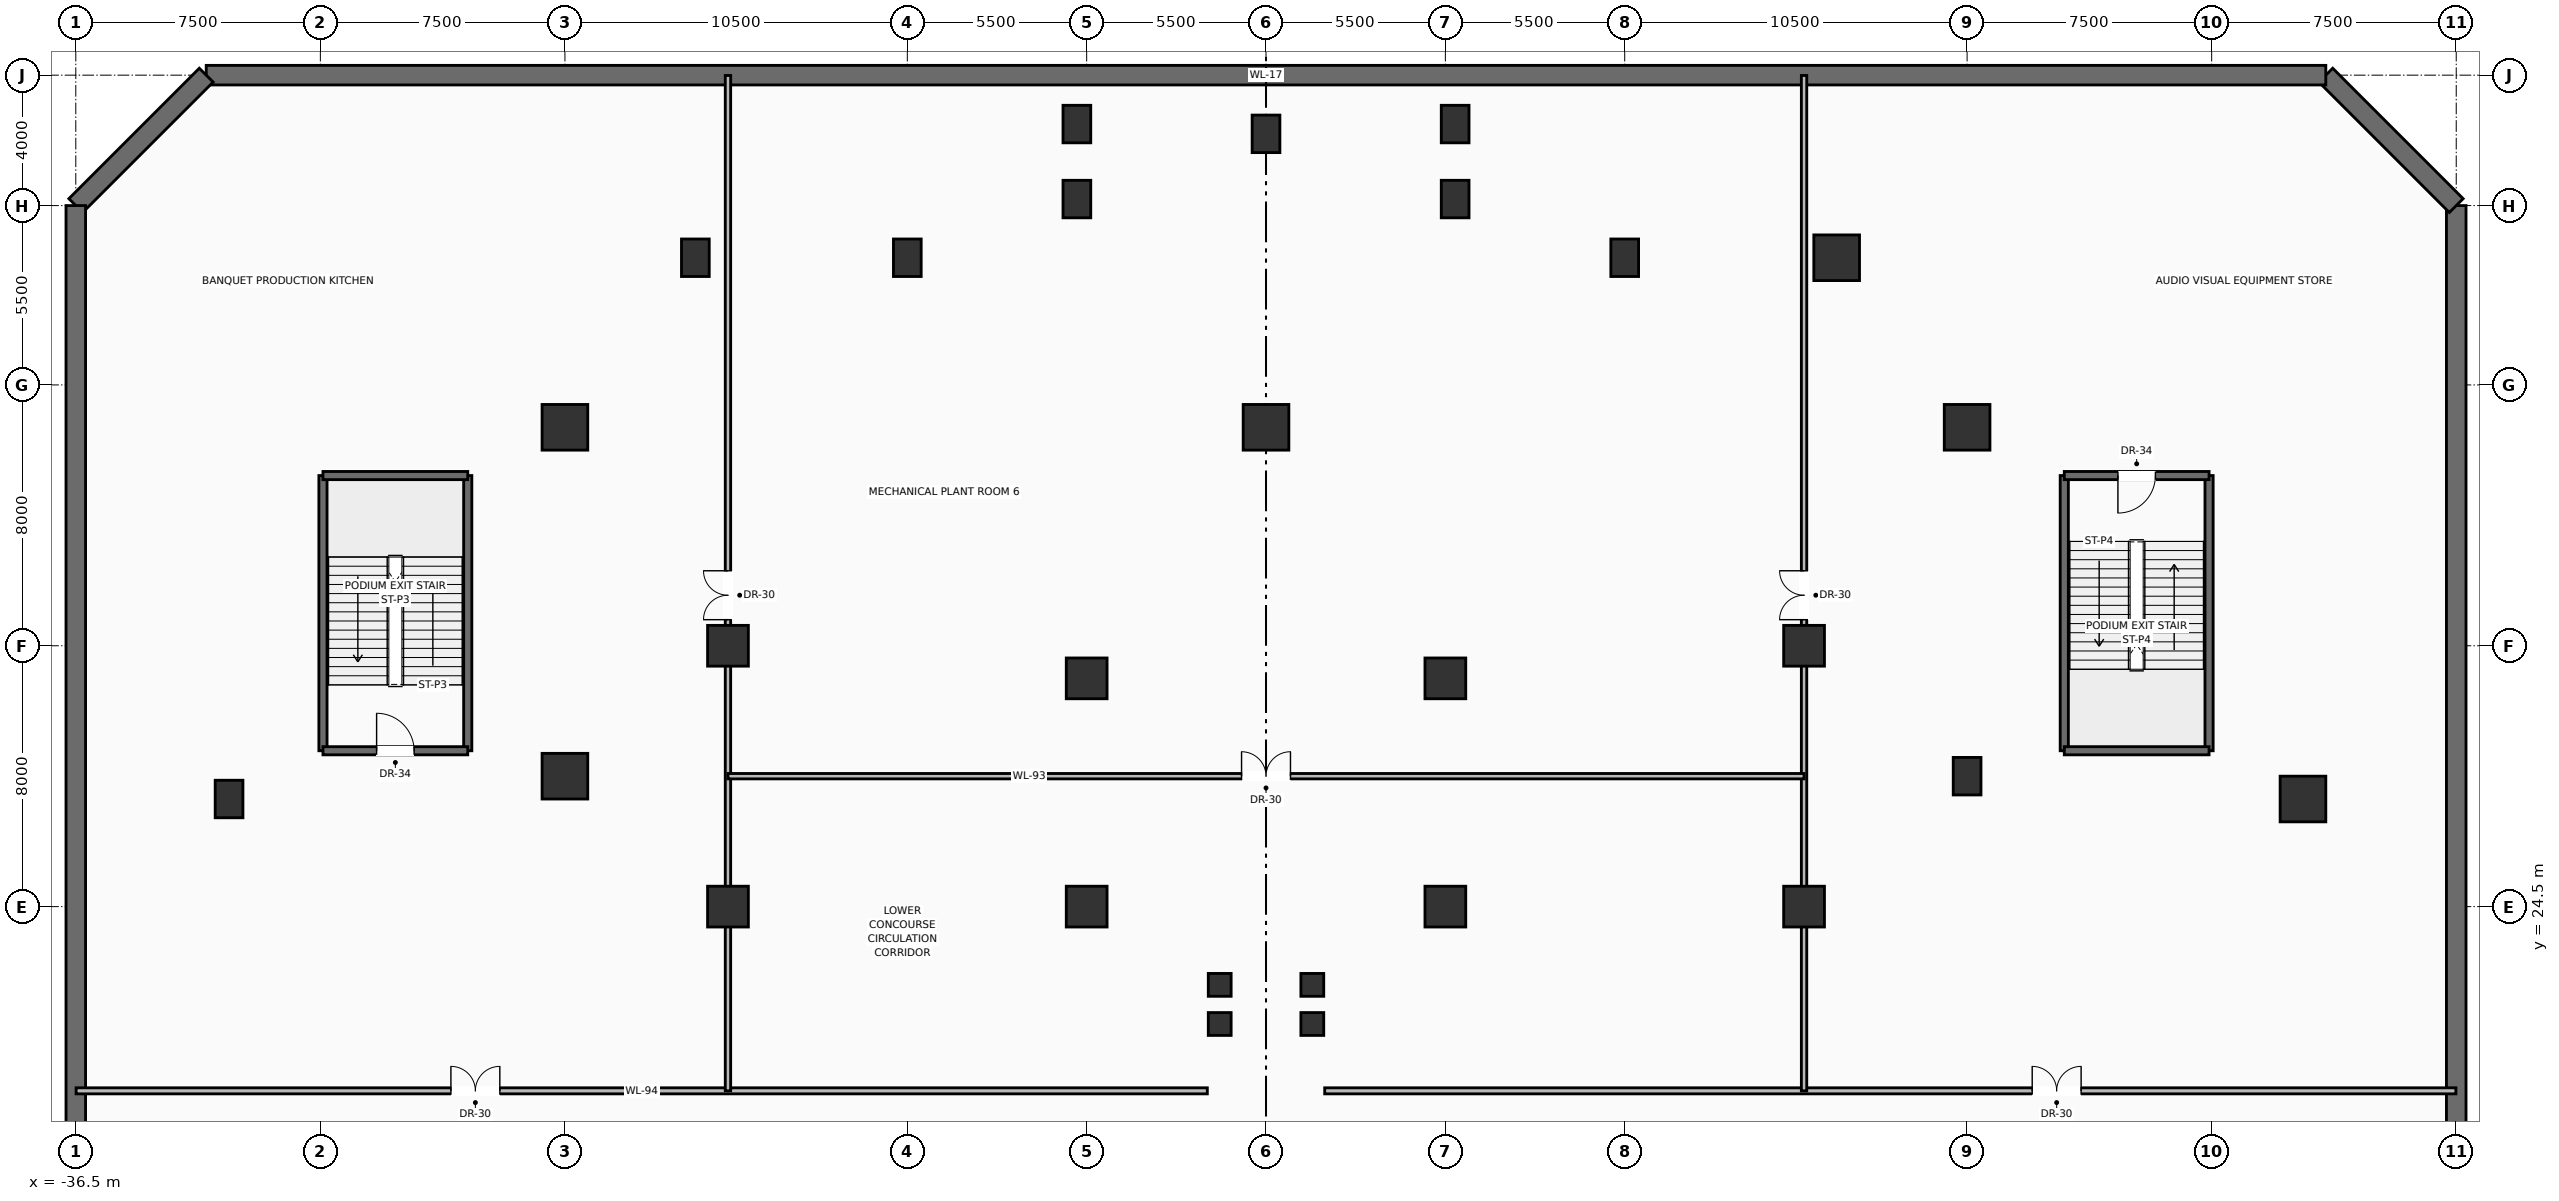
"""IFC4 building model, lengths in metres.
Left out: names, types, materials, properties, quantities, classifications, styles, units other than length and angle.
Written with IfcOpenShell. Run it as: python <this file> out.ifc"""

import sys

from ifc_helpers import new_model, si_unit, direction, frame, frame_2d, origin, origin_2d, place, context, subcontext, project, spatial, rectangle, hollow_rectangle, extrude, source, transform, mapped, element, fill, save


model = new_model("IFC4")
c1 = context("Model", 3, precision=1e-05, world=origin(), true_north=direction((0.0, 1.0)))
c2 = subcontext(c1, "Body", "Model", "MODEL_VIEW")
j1 = project(units=[si_unit("LENGTHUNIT", "METRE"), si_unit("PLANEANGLEUNIT", "RADIAN")], contexts=[c1])
p1 = place(None, origin())
s1 = spatial("IfcSite", under=j1, at=p1, CompositionType="ELEMENT")
p2 = place(p1, origin())
s2 = spatial("IfcBuilding", under=s1, at=p2, CompositionType="ELEMENT")
p3 = place(p2, frame((0.0, 0.0, -5.0)))
s3 = spatial("IfcBuildingStorey", under=s2, at=p3, CompositionType="ELEMENT", Elevation=-5.0)
p4 = place(p3, frame((36.5, 4.0, 0.0), z_axis=(0.0, 0.0, 1.0), x_axis=(0.0, 1.0, 0.0)))
e1 = element("IfcWall", 1, at=p4, inside=s3, PredefinedType="SOLIDWALL", context=c2, shape_type="SweptSolid", body=[
    extrude(rectangle(XDim=42.0, YDim=0.6, at=frame_2d((21.0, 0.0))), origin(), (0.0, 0.0, 1.0), 4.64),
])
p5 = place(p3, frame((36.5, 46.0, 0.0), z_axis=(0.0, 0.0, 1.0), x_axis=(-0.707106781187, 0.707106781187, 0.0)))
e2 = element("IfcWall", 2, at=p5, inside=s3, PredefinedType="SOLIDWALL", context=c2, shape_type="SweptSolid", body=[
    extrude(rectangle(XDim=5.657, YDim=0.6, at=frame_2d((2.828, 0.0))), origin(), (0.0, 0.0, 1.0), 4.64),
])
p6 = place(p3, frame((32.5, 50.0, 0.0), z_axis=(0.0, 0.0, 1.0), x_axis=(-1.0, 0.0, 0.0)))
e3 = element("IfcWall", 3, at=p6, inside=s3, PredefinedType="SOLIDWALL", context=c2, shape_type="SweptSolid", body=[
    extrude(rectangle(XDim=65.0, YDim=0.6, at=frame_2d((32.5, 0.0))), origin(), (0.0, 0.0, 1.0), 4.64),
])
p7 = place(p3, frame((-32.5, 50.0, 0.0), z_axis=(0.0, 0.0, 1.0), x_axis=(-0.707106781187, -0.707106781187, 0.0)))
e4 = element("IfcWall", 4, at=p7, inside=s3, PredefinedType="SOLIDWALL", context=c2, shape_type="SweptSolid", body=[
    extrude(rectangle(XDim=5.657, YDim=0.6, at=frame_2d((2.828, 0.0))), origin(), (0.0, 0.0, 1.0), 4.64),
])
p8 = place(p3, frame((-36.5, 46.0, 0.0), z_axis=(0.0, 0.0, 1.0), x_axis=(0.0, -1.0, 0.0)))
e5 = element("IfcWall", 5, at=p8, inside=s3, PredefinedType="SOLIDWALL", context=c2, shape_type="SweptSolid", body=[
    extrude(rectangle(XDim=42.0, YDim=0.6, at=frame_2d((21.0, 0.0))), origin(), (0.0, 0.0, 1.0), 4.64),
])
m1 = source(origin(), c2, "Body", "SweptSolid", [
    extrude(rectangle(XDim=0.85, YDim=1.15, at=origin_2d()), origin(), (0.0, 0.0, 1.0), 5.0),
])
for number, where, z_axis, x_axis in (
    (6, (-5.8, 46.2, 0.0), (0.0, 0.0, 1.0), (1.0, 0.0, 0.0)),
    (7, (5.8, 46.2, 0.0), (0.0, 0.0, 1.0), (1.0, 0.0, 0.0)),
    (8, (0.0, 48.2, 0.0), (0.0, 0.0, 1.0), (1.0, 0.0, 0.0)),
    (9, (-5.8, 48.5, 0.0), (0.0, 0.0, 1.0), (1.0, 0.0, 0.0)),
    (10, (5.8, 48.5, 0.0), (0.0, 0.0, 1.0), (1.0, 0.0, 0.0)),
):
    element("IfcColumn", number, at=place(p3, frame(where, z_axis=z_axis, x_axis=x_axis)), inside=s3, PredefinedType="COLUMN", context=c2, shape_type="MappedRepresentation", body=[
        mapped(m1, transform((0.0, 0.0, 0.0), scale=1.0)),
    ])
m2 = source(origin(), c2, "Body", "SweptSolid", [
    extrude(hollow_rectangle(XDim=0.7, YDim=0.7, WallThickness=0.036, at=origin_2d()), origin(), (0.0, 0.0, 1.0), 5.0),
])
for number, where, z_axis, x_axis in (
    (11, (-1.42, 20.9, 0.0), (0.0, 0.0, 1.0), (1.0, 0.0, 0.0)),
    (12, (1.42, 20.9, 0.0), (0.0, 0.0, 1.0), (1.0, 0.0, 0.0)),
    (13, (-1.42, 22.1, 0.0), (0.0, 0.0, 1.0), (1.0, 0.0, 0.0)),
    (14, (1.42, 22.1, 0.0), (0.0, 0.0, 1.0), (1.0, 0.0, 0.0)),
):
    element("IfcColumn", number, at=place(p3, frame(where, z_axis=z_axis, x_axis=x_axis)), inside=s3, PredefinedType="COLUMN", context=c2, shape_type="MappedRepresentation", body=[
        mapped(m2, transform((0.0, 0.0, 0.0), scale=1.0)),
    ])
m3 = source(origin(), c2, "Body", "SweptSolid", [
    extrude(hollow_rectangle(XDim=1.4, YDim=1.4, WallThickness=0.07, at=origin_2d()), origin(), (0.0, 0.0, 1.0), 5.0),
])
p9 = place(p3, frame((-21.5, 28.5, 0.0), z_axis=(0.0, 0.0, 1.0), x_axis=(1.0, 0.0, 0.0)))
e15 = element("IfcColumn", 15, at=p9, inside=s3, PredefinedType="COLUMN", context=c2, shape_type="MappedRepresentation", body=[
    mapped(m3, transform((0.0, 0.0, 0.0), scale=1.0)),
])
p10 = place(p3, frame((21.5, 28.5, 0.0), z_axis=(0.0, 0.0, 1.0), x_axis=(1.0, 0.0, 0.0)))
e16 = element("IfcColumn", 16, at=p10, inside=s3, PredefinedType="COLUMN", context=c2, shape_type="MappedRepresentation", body=[
    mapped(m1, transform((0.0, 0.0, 0.0), scale=1.0)),
])
p11 = place(p3, frame((-21.5, 39.2, 0.0), z_axis=(0.0, 0.0, 1.0), x_axis=(1.0, 0.0, 0.0)))
e17 = element("IfcColumn", 17, at=p11, inside=s3, PredefinedType="COLUMN", context=c2, shape_type="MappedRepresentation", body=[
    mapped(m3, transform((0.0, 0.0, 0.0), scale=1.0)),
])
p12 = place(p3, frame((-11.0, 44.4, 0.0), z_axis=(0.0, 0.0, 1.0), x_axis=(1.0, 0.0, 0.0)))
e18 = element("IfcColumn", 18, at=p12, inside=s3, PredefinedType="COLUMN", context=c2, shape_type="MappedRepresentation", body=[
    mapped(m1, transform((0.0, 0.0, 0.0), scale=1.0)),
])
p13 = place(p3, frame((0.0, 39.2, 0.0), z_axis=(0.0, 0.0, 1.0), x_axis=(1.0, 0.0, 0.0)))
e19 = element("IfcColumn", 19, at=p13, inside=s3, PredefinedType="COLUMN", context=c2, shape_type="MappedRepresentation", body=[
    mapped(m3, transform((0.0, 0.0, 0.0), scale=1.0)),
])
p14 = place(p3, frame((11.0, 44.4, 0.0), z_axis=(0.0, 0.0, 1.0), x_axis=(1.0, 0.0, 0.0)))
e20 = element("IfcColumn", 20, at=p14, inside=s3, PredefinedType="COLUMN", context=c2, shape_type="MappedRepresentation", body=[
    mapped(m1, transform((0.0, 0.0, 0.0), scale=1.0)),
])
p15 = place(p3, frame((21.5, 39.2, 0.0), z_axis=(0.0, 0.0, 1.0), x_axis=(1.0, 0.0, 0.0)))
e21 = element("IfcColumn", 21, at=p15, inside=s3, PredefinedType="COLUMN", context=c2, shape_type="MappedRepresentation", body=[
    mapped(m3, transform((0.0, 0.0, 0.0), scale=1.0)),
])
p16 = place(p3, frame((-31.8, 27.8, 0.0), z_axis=(0.0, 0.0, 1.0), x_axis=(1.0, 0.0, 0.0)))
e22 = element("IfcColumn", 22, at=p16, inside=s3, PredefinedType="COLUMN", context=c2, shape_type="MappedRepresentation", body=[
    mapped(m1, transform((0.0, 0.0, 0.0), scale=1.0)),
])
p17 = place(p3, frame((31.8, 27.8, 0.0), z_axis=(0.0, 0.0, 1.0), x_axis=(1.0, 0.0, 0.0)))
e23 = element("IfcColumn", 23, at=p17, inside=s3, PredefinedType="COLUMN", context=c2, shape_type="MappedRepresentation", body=[
    mapped(m3, transform((0.0, 0.0, 0.0), scale=1.0)),
])
p18 = place(p3, frame((-17.5, 44.4, 0.0), z_axis=(0.0, 0.0, 1.0), x_axis=(1.0, 0.0, 0.0)))
e24 = element("IfcColumn", 24, at=p18, inside=s3, PredefinedType="COLUMN", context=c2, shape_type="MappedRepresentation", body=[
    mapped(m1, transform((0.0, 0.0, 0.0), scale=1.0)),
])
p19 = place(p3, frame((17.5, 44.4, 0.0), z_axis=(0.0, 0.0, 1.0), x_axis=(1.0, 0.0, 0.0)))
e25 = element("IfcColumn", 25, at=p19, inside=s3, PredefinedType="COLUMN", context=c2, shape_type="MappedRepresentation", body=[
    mapped(m3, transform((0.0, 0.0, 0.0), scale=1.0)),
])
m4 = source(origin(), c2, "Body", "SweptSolid", [
    extrude(rectangle(XDim=1.25, YDim=1.25, at=origin_2d()), origin(), (0.0, 0.0, 1.0), 5.0),
])
for number, where, z_axis, x_axis in (
    (26, (-5.5, 24.5, 0.0), (0.0, 0.0, 1.0), (1.0, 0.0, 0.0)),
    (27, (5.5, 24.5, 0.0), (0.0, 0.0, 1.0), (1.0, 0.0, 0.0)),
    (28, (-5.5, 31.5, 0.0), (0.0, 0.0, 1.0), (1.0, 0.0, 0.0)),
    (29, (5.5, 31.5, 0.0), (0.0, 0.0, 1.0), (1.0, 0.0, 0.0)),
):
    element("IfcColumn", number, at=place(p3, frame(where, z_axis=z_axis, x_axis=x_axis)), inside=s3, PredefinedType="COLUMN", context=c2, shape_type="MappedRepresentation", body=[
        mapped(m4, transform((0.0, 0.0, 0.0), scale=1.0)),
    ])
m5 = source(origin(), c2, "Body", "SweptSolid", [
    extrude(rectangle(XDim=1.25, YDim=1.25, at=origin_2d()), origin(), (0.0, 0.0, 1.0), 4.64),
])
for number, where, z_axis, x_axis in (
    (30, (-16.5, 24.5, 0.0), (0.0, 0.0, 1.0), (1.0, 0.0, 0.0)),
    (31, (16.5, 24.5, 0.0), (0.0, 0.0, 1.0), (1.0, 0.0, 0.0)),
    (32, (-16.5, 32.5, 0.0), (0.0, 0.0, 1.0), (1.0, 0.0, 0.0)),
    (33, (16.5, 32.5, 0.0), (0.0, 0.0, 1.0), (1.0, 0.0, 0.0)),
):
    element("IfcColumn", number, at=place(p3, frame(where, z_axis=z_axis, x_axis=x_axis)), inside=s3, PredefinedType="COLUMN", context=c2, shape_type="MappedRepresentation", body=[
        mapped(m5, transform((0.0, 0.0, 0.0), scale=1.0)),
    ])
for number, where, z_axis, x_axis in (
    (34, (-28.92, 29.28, 0.0), (0.0, 0.0, 1.0), (0.0, 1.0, 0.0)),
    (35, (-24.48, 29.28, 0.0), (0.0, 0.0, 1.0), (0.0, 1.0, 0.0)),
):
    element("IfcWall", number, at=place(p3, frame(where, z_axis=z_axis, x_axis=x_axis)), inside=s3, PredefinedType="SOLIDWALL", context=c2, shape_type="SweptSolid", body=[
        extrude(rectangle(XDim=8.44, YDim=0.25, at=frame_2d((4.22, 0.0))), origin(), (0.0, 0.0, 1.0), 4.64),
    ])
p20 = place(p3, frame((-28.92, 29.28, 0.0), z_axis=(0.0, 0.0, 1.0), x_axis=(1.0, 0.0, 0.0)))
e36 = element("IfcWall", 36, at=p20, inside=s3, PredefinedType="SOLIDWALL", context=c2, shape_type="SweptSolid", body=[
    extrude(rectangle(XDim=4.44, YDim=0.25, at=frame_2d((2.22, 0.0))), origin(), (0.0, 0.0, 1.0), 4.64),
])
p21 = place(p20, frame((1.645, 0.0, 0.0)))
e37 = element("IfcOpeningElement", 37, at=p21, cuts=e36, PredefinedType="OPENING", context=c2, shape_type="SweptSolid", body=[
    extrude(rectangle(XDim=1.15, YDim=2.2, at=frame_2d((0.575, 1.1))), frame((0.0, 0.135, 0.0), z_axis=(0.0, -1.0, 0.0), x_axis=(1.0, 0.0, 0.0)), (0.0, 0.0, 1.0), 0.27),
])
p22 = place(p3, frame((-24.48, 37.72, 0.0), z_axis=(0.0, 0.0, 1.0), x_axis=(-1.0, 0.0, 0.0)))
e38 = element("IfcWall", 38, at=p22, inside=s3, PredefinedType="SOLIDWALL", context=c2, shape_type="SweptSolid", body=[
    extrude(rectangle(XDim=4.44, YDim=0.25, at=frame_2d((2.22, 0.0))), origin(), (0.0, 0.0, 1.0), 4.64),
])
for number, where, z_axis, x_axis in (
    (39, (24.48, 29.28, 0.0), (0.0, 0.0, 1.0), (0.0, 1.0, 0.0)),
    (40, (28.92, 29.28, 0.0), (0.0, 0.0, 1.0), (0.0, 1.0, 0.0)),
):
    element("IfcWall", number, at=place(p3, frame(where, z_axis=z_axis, x_axis=x_axis)), inside=s3, PredefinedType="SOLIDWALL", context=c2, shape_type="SweptSolid", body=[
        extrude(rectangle(XDim=8.44, YDim=0.25, at=frame_2d((4.22, 0.0))), origin(), (0.0, 0.0, 1.0), 4.64),
    ])
p23 = place(p3, frame((24.48, 29.28, 0.0), z_axis=(0.0, 0.0, 1.0), x_axis=(1.0, 0.0, 0.0)))
e41 = element("IfcWall", 41, at=p23, inside=s3, PredefinedType="SOLIDWALL", context=c2, shape_type="SweptSolid", body=[
    extrude(rectangle(XDim=4.44, YDim=0.25, at=frame_2d((2.22, 0.0))), origin(), (0.0, 0.0, 1.0), 4.64),
])
p24 = place(p3, frame((28.92, 37.72, 0.0), z_axis=(0.0, 0.0, 1.0), x_axis=(-1.0, 0.0, 0.0)))
e42 = element("IfcWall", 42, at=p24, inside=s3, PredefinedType="SOLIDWALL", context=c2, shape_type="SweptSolid", body=[
    extrude(rectangle(XDim=4.44, YDim=0.25, at=frame_2d((2.22, 0.0))), origin(), (0.0, 0.0, 1.0), 4.64),
])
p25 = place(p24, frame((1.645, 0.0, 0.0)))
e43 = element("IfcOpeningElement", 43, at=p25, cuts=e42, PredefinedType="OPENING", context=c2, shape_type="SweptSolid", body=[
    extrude(rectangle(XDim=1.15, YDim=2.2, at=frame_2d((0.575, 1.1))), frame((0.0, 0.135, 0.0), z_axis=(0.0, -1.0, 0.0), x_axis=(1.0, 0.0, 0.0)), (0.0, 0.0, 1.0), 0.27),
])
p26 = place(p3, frame((-36.49, 18.85, 0.0), z_axis=(0.0, 0.0, 1.0), x_axis=(1.0, 0.0, 0.0)))
e44 = element("IfcWall", 44, at=p26, inside=s3, PredefinedType="PARTITIONING", context=c2, shape_type="SweptSolid", body=[
    extrude(rectangle(XDim=34.69, YDim=0.185, at=frame_2d((17.345, 0.0))), origin(), (0.0, 0.0, 1.0), 3.592),
])
p27 = place(p26, frame((11.493, 0.0, 0.0)))
e45 = element("IfcOpeningElement", 45, at=p27, cuts=e44, PredefinedType="OPENING", context=c2, shape_type="SweptSolid", body=[
    extrude(rectangle(XDim=1.5, YDim=2.25, at=frame_2d((0.75, 1.125))), frame((0.0, 0.103, 0.0), z_axis=(0.0, -1.0, 0.0), x_axis=(1.0, 0.0, 0.0)), (0.0, 0.0, 1.0), 0.205),
])
p28 = place(p3, frame((1.8, 18.85, 0.0), z_axis=(0.0, 0.0, 1.0), x_axis=(1.0, 0.0, 0.0)))
e46 = element("IfcWall", 46, at=p28, inside=s3, PredefinedType="PARTITIONING", context=c2, shape_type="SweptSolid", body=[
    extrude(rectangle(XDim=34.69, YDim=0.185, at=frame_2d((17.345, 0.0))), origin(), (0.0, 0.0, 1.0), 3.592),
])
p29 = place(p28, frame((21.697, 0.0, 0.0)))
e47 = element("IfcOpeningElement", 47, at=p29, cuts=e46, PredefinedType="OPENING", context=c2, shape_type="SweptSolid", body=[
    extrude(rectangle(XDim=1.5, YDim=2.25, at=frame_2d((0.75, 1.125))), frame((0.0, 0.103, 0.0), z_axis=(0.0, -1.0, 0.0), x_axis=(1.0, 0.0, 0.0)), (0.0, 0.0, 1.0), 0.205),
])
p30 = place(p3, frame((-16.5, 18.85, 0.0), z_axis=(0.0, 0.0, 1.0), x_axis=(0.0, 1.0, 0.0)))
e48 = element("IfcWall", 48, at=p30, inside=s3, PredefinedType="PARTITIONING", context=c2, shape_type="SweptSolid", body=[
    extrude(rectangle(XDim=31.14, YDim=0.165, at=frame_2d((15.57, 0.0))), origin(), (0.0, 0.0, 1.0), 3.592),
])
p31 = place(p30, frame((14.45, 0.0, 0.0)))
e49 = element("IfcOpeningElement", 49, at=p31, cuts=e48, PredefinedType="OPENING", context=c2, shape_type="SweptSolid", body=[
    extrude(rectangle(XDim=1.5, YDim=2.25, at=frame_2d((0.75, 1.125))), frame((0.0, 0.093, 0.0), z_axis=(0.0, -1.0, 0.0), x_axis=(1.0, 0.0, 0.0)), (0.0, 0.0, 1.0), 0.185),
])
p32 = place(p3, frame((16.5, 18.85, 0.0), z_axis=(0.0, 0.0, 1.0), x_axis=(0.0, 1.0, 0.0)))
e50 = element("IfcWall", 50, at=p32, inside=s3, PredefinedType="PARTITIONING", context=c2, shape_type="SweptSolid", body=[
    extrude(rectangle(XDim=31.14, YDim=0.165, at=frame_2d((15.57, 0.0))), origin(), (0.0, 0.0, 1.0), 3.592),
])
p33 = place(p32, frame((14.45, 0.0, 0.0)))
e51 = element("IfcOpeningElement", 51, at=p33, cuts=e50, PredefinedType="OPENING", context=c2, shape_type="SweptSolid", body=[
    extrude(rectangle(XDim=1.5, YDim=2.25, at=frame_2d((0.75, 1.125))), frame((0.0, 0.093, 0.0), z_axis=(0.0, -1.0, 0.0), x_axis=(1.0, 0.0, 0.0)), (0.0, 0.0, 1.0), 0.185),
])
p34 = place(p3, frame((-16.5, 28.5, 0.0), z_axis=(0.0, 0.0, 1.0), x_axis=(1.0, 0.0, 0.0)))
e52 = element("IfcWall", 52, at=p34, inside=s3, PredefinedType="PARTITIONING", context=c2, shape_type="SweptSolid", body=[
    extrude(rectangle(XDim=33.0, YDim=0.165, at=frame_2d((16.5, 0.0))), origin(), (0.0, 0.0, 1.0), 3.592),
])
p35 = place(p34, frame((15.75, 0.0, 0.0)))
e53 = element("IfcOpeningElement", 53, at=p35, cuts=e52, PredefinedType="OPENING", context=c2, shape_type="SweptSolid", body=[
    extrude(rectangle(XDim=1.5, YDim=2.25, at=frame_2d((0.75, 1.125))), frame((0.0, 0.093, 0.0), z_axis=(0.0, -1.0, 0.0), x_axis=(1.0, 0.0, 0.0)), (0.0, 0.0, 1.0), 0.185),
])
m6 = source(origin(), c2, "Body", "SweptSolid", [
    extrude(rectangle(XDim=1.15, YDim=2.2, at=frame_2d((0.575, 1.1))), frame((0.0, 0.025, 0.0), z_axis=(0.0, -1.0, 0.0), x_axis=(1.0, 0.0, 0.0)), (0.0, 0.0, 1.0), 0.05),
])
p36 = place(p21, origin())
e54 = element("IfcDoor", 54, at=p36, inside=s3, OperationType="SINGLE_SWING_LEFT", PredefinedType="DOOR", context=c2, shape_type="MappedRepresentation", body=[
    mapped(m6, transform((0.0, 0.0, 0.0), scale=1.0)),
])
fill(e37, e54)
p37 = place(p25, origin())
e55 = element("IfcDoor", 55, at=p37, inside=s3, OperationType="SINGLE_SWING_RIGHT", PredefinedType="DOOR", context=c2, shape_type="MappedRepresentation", body=[
    mapped(m6, transform((0.0, 0.0, 0.0), scale=1.0)),
])
fill(e43, e55)
m7 = source(origin(), c2, "Body", "SweptSolid", [
    extrude(rectangle(XDim=1.5, YDim=2.25, at=frame_2d((0.75, 1.125))), frame((0.0, 0.025, 0.0), z_axis=(0.0, -1.0, 0.0), x_axis=(1.0, 0.0, 0.0)), (0.0, 0.0, 1.0), 0.05),
])
p38 = place(p27, origin())
e56 = element("IfcDoor", 56, at=p38, inside=s3, OperationType="DOUBLE_DOOR_SINGLE_SWING", PredefinedType="DOOR", context=c2, shape_type="MappedRepresentation", body=[
    mapped(m7, transform((0.0, 0.0, 0.0), scale=1.0)),
])
fill(e45, e56)
p39 = place(p29, origin())
e57 = element("IfcDoor", 57, at=p39, inside=s3, OperationType="DOUBLE_DOOR_SINGLE_SWING", PredefinedType="DOOR", context=c2, shape_type="MappedRepresentation", body=[
    mapped(m7, transform((0.0, 0.0, 0.0), scale=1.0)),
])
fill(e47, e57)
p40 = place(p31, origin())
e58 = element("IfcDoor", 58, at=p40, inside=s3, OperationType="DOUBLE_DOOR_SINGLE_SWING", PredefinedType="DOOR", context=c2, shape_type="MappedRepresentation", body=[
    mapped(m7, transform((0.0, 0.0, 0.0), scale=1.0)),
])
fill(e49, e58)
p41 = place(p33, origin())
e59 = element("IfcDoor", 59, at=p41, inside=s3, OperationType="DOUBLE_DOOR_SINGLE_SWING", PredefinedType="DOOR", context=c2, shape_type="MappedRepresentation", body=[
    mapped(m7, transform((0.0, 0.0, 0.0), scale=1.0)),
])
fill(e51, e59)
p42 = place(p35, origin())
e60 = element("IfcDoor", 60, at=p42, inside=s3, OperationType="DOUBLE_DOOR_SINGLE_SWING", PredefinedType="DOOR", context=c2, shape_type="MappedRepresentation", body=[
    mapped(m7, transform((0.0, 0.0, 0.0), scale=1.0)),
])
fill(e53, e60)
save(model, sys.argv[1])
